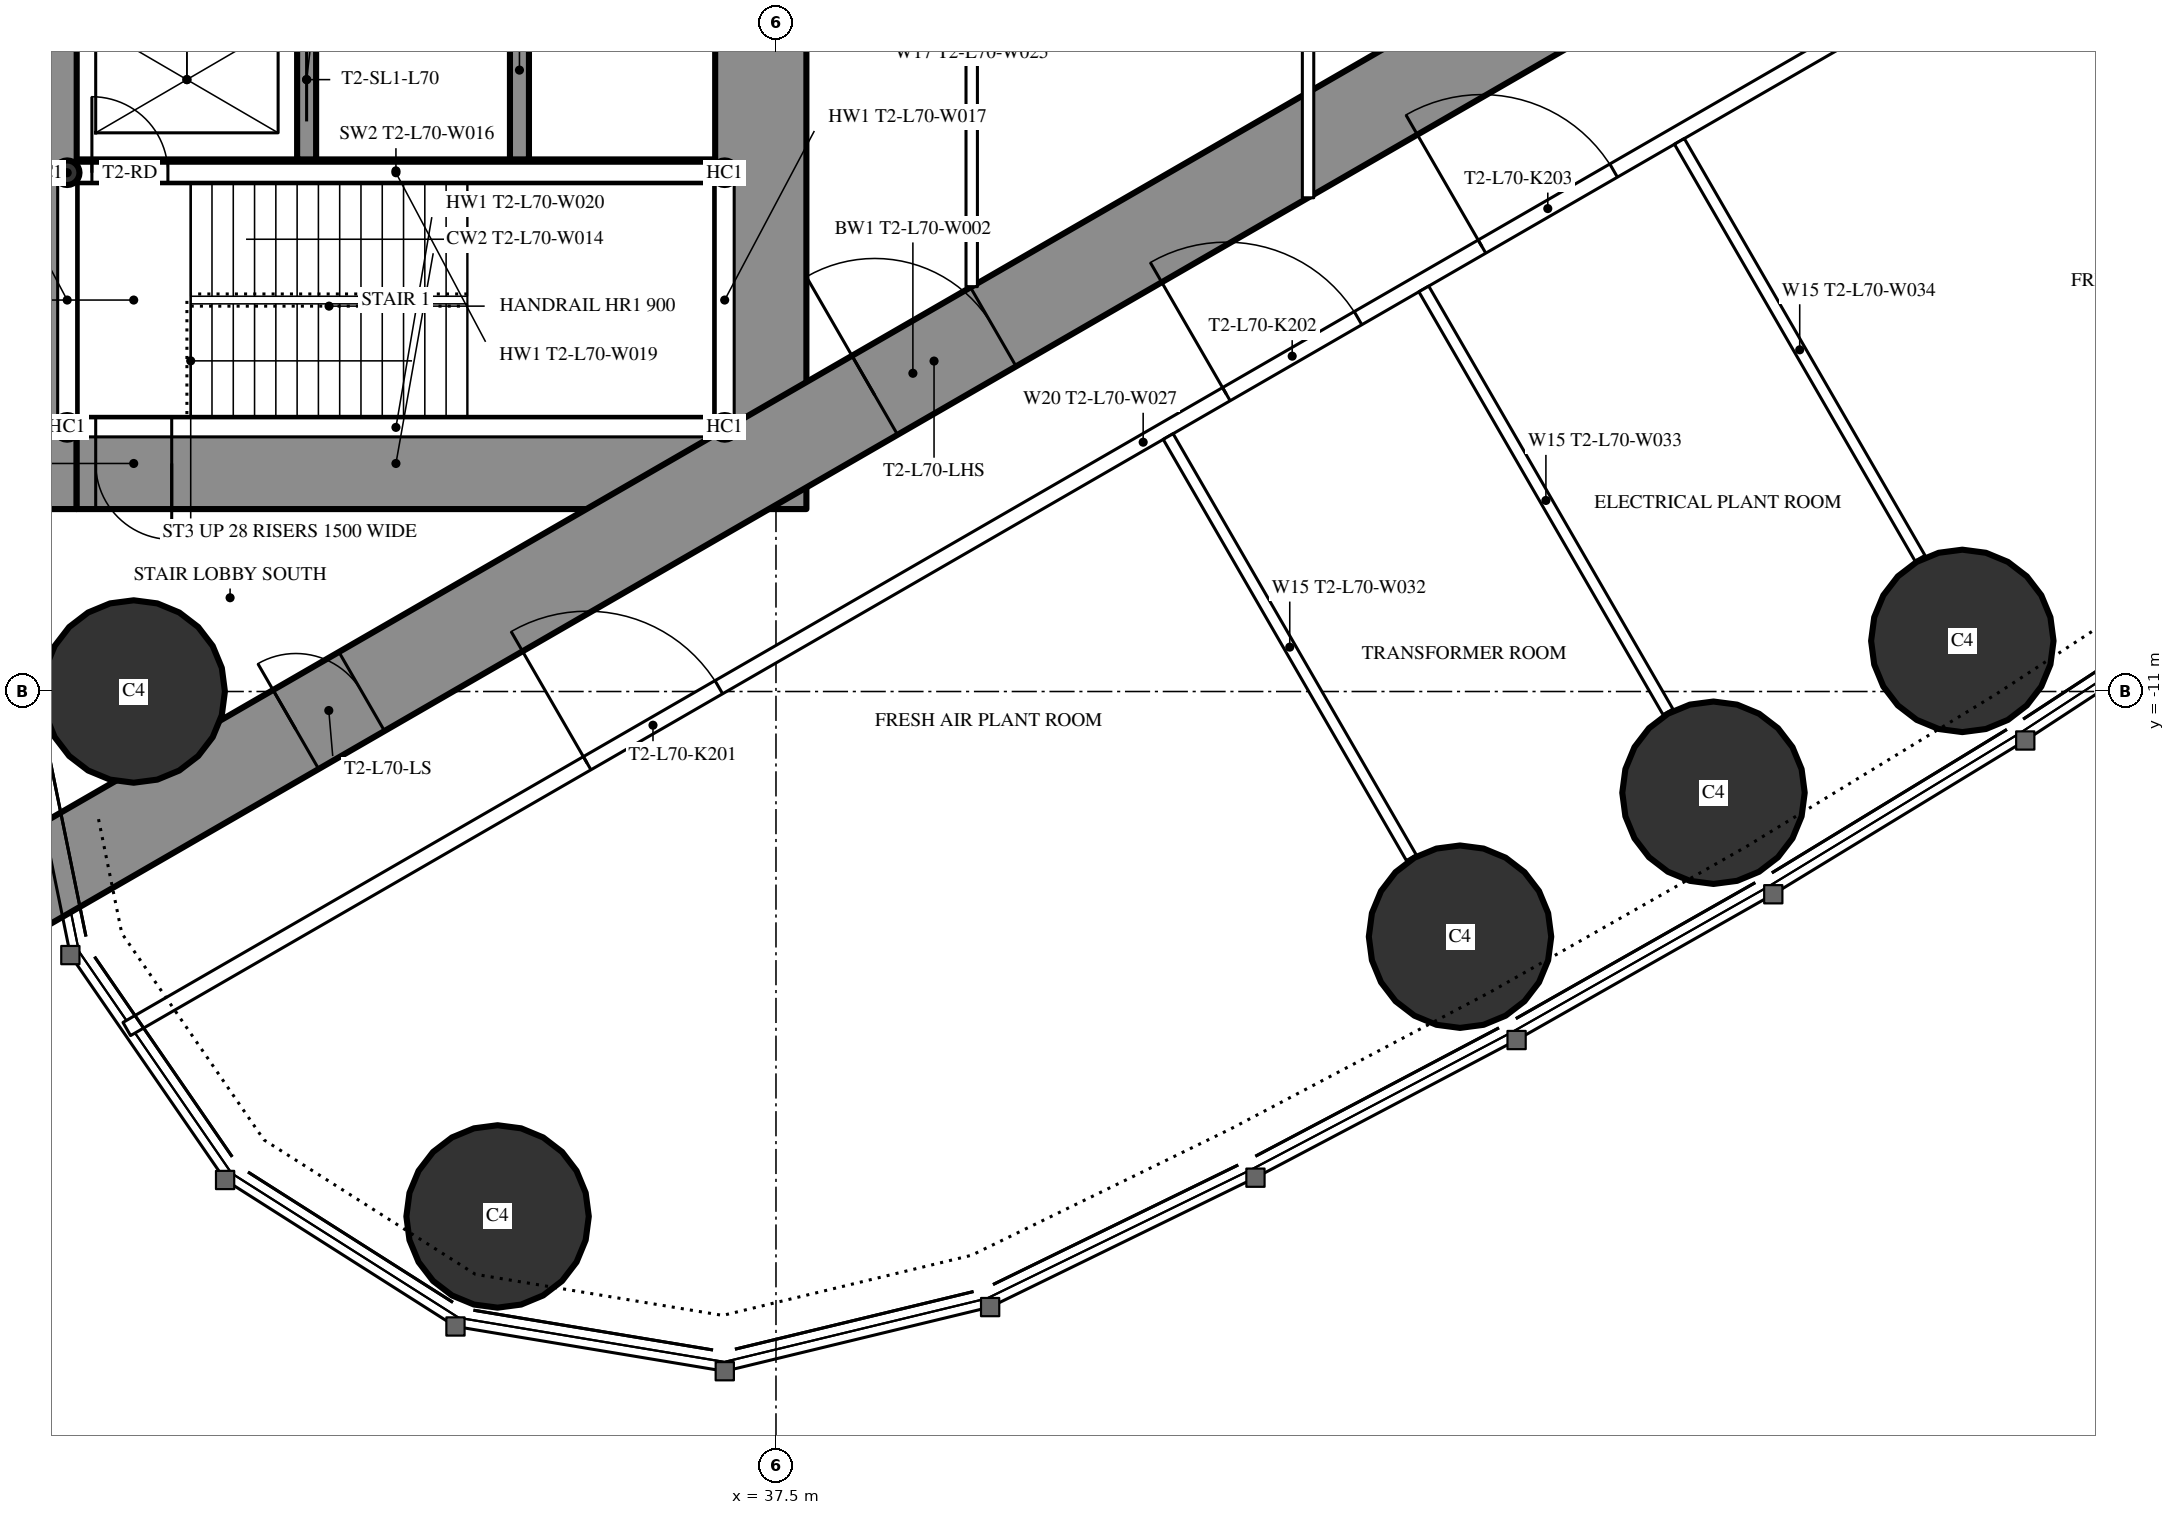
"""IFC4 building model, lengths in metres.
Left out: names, types, materials, properties, quantities, classifications, styles, units other than length and angle.
Written with IfcOpenShell. Run it as: python <this file> out.ifc"""

import sys

from ifc_helpers import new_model, si_unit, direction, frame, frame_2d, origin, origin_2d, place, context, subcontext, project, spatial, rectangle, circle, hollow_circle, extrude, element, fill, save


model = new_model("IFC4")
c1 = context("Model", 3, precision=1e-05, world=origin(), true_north=direction((0.0, 1.0)))
c2 = subcontext(c1, "Body", "Model", "MODEL_VIEW")
j1 = project(units=[si_unit("LENGTHUNIT", "METRE"), si_unit("PLANEANGLEUNIT", "RADIAN")], contexts=[c1])
p1 = place(None, origin())
s1 = spatial("IfcSite", under=j1, at=p1, CompositionType="ELEMENT")
p2 = place(p1, origin())
s2 = spatial("IfcBuilding", under=s1, at=p2, CompositionType="ELEMENT")
p3 = place(p2, frame((0.0, 0.0, 268.3)))
s3 = spatial("IfcBuildingStorey", under=s2, at=p3, CompositionType="ELEMENT", Elevation=268.3)
for number, where, z_axis, x_axis in (
    (1, (33.837, -17.906, 0.0), (0.0, 0.0, 1.0), (1.0, 0.0, 0.0)),
    (2, (29.05, -11.0, 0.0), (0.0, 0.0, 1.0), (1.0, 0.0, 0.0)),
    (3, (46.499, -14.226, 0.0), (0.0, 0.0, 1.0), (1.0, 0.0, 0.0)),
    (4, (49.834, -12.332, 0.0), (0.0, 0.0, 1.0), (1.0, 0.0, 0.0)),
    (5, (53.108, -10.334, 0.0), (0.0, 0.0, 1.0), (1.0, 0.0, 0.0)),
):
    element("IfcColumn", number, at=place(p3, frame(where, z_axis=z_axis, x_axis=x_axis)), inside=s3, PredefinedType="COLUMN", context=c2, shape_type="SweptSolid", body=[
        extrude(circle(Radius=1.2, at=origin_2d()), origin(), (0.0, 0.0, 1.0), 5.0),
    ])
p4 = place(p3, frame((27.9, -8.6, 0.0), z_axis=(0.0, 0.0, 1.0), x_axis=(0.0, 1.0, 0.0)))
e6 = element("IfcWall", 6, at=p4, inside=s3, PredefinedType="SHEAR", context=c2, shape_type="SweptSolid", body=[
    extrude(rectangle(XDim=17.2, YDim=0.8, at=frame_2d((8.6, 0.0))), origin(), (0.0, 0.0, 1.0), 5.0),
])
p5 = place(p4, frame((9.35, 0.0, 0.0)))
e7 = element("IfcOpeningElement", 7, at=p5, cuts=e6, PredefinedType="OPENING", context=c2, shape_type="SweptSolid", body=[
    extrude(rectangle(XDim=0.9, YDim=2.2, at=frame_2d((0.45, 1.1))), frame((0.0, 0.41, 0.0), z_axis=(0.0, -1.0, 0.0), x_axis=(1.0, 0.0, 0.0)), (0.0, 0.0, 1.0), 0.82),
])
p6 = place(p3, frame((37.3, -8.6, 0.0), z_axis=(0.0, 0.0, 1.0), x_axis=(0.0, 1.0, 0.0)))
e8 = element("IfcWall", 8, at=p6, inside=s3, PredefinedType="SHEAR", context=c2, shape_type="SweptSolid", body=[
    extrude(rectangle(XDim=17.2, YDim=1.2, at=frame_2d((8.6, 0.0))), origin(), (0.0, 0.0, 1.0), 5.0),
])
p7 = place(p6, frame((7.7, 0.0, 0.0)))
e9 = element("IfcOpeningElement", 9, at=p7, cuts=e8, PredefinedType="OPENING", context=c2, shape_type="SweptSolid", body=[
    extrude(rectangle(XDim=1.8, YDim=2.2, at=frame_2d((0.9, 1.1))), frame((0.0, 0.61, 0.0), z_axis=(0.0, -1.0, 0.0), x_axis=(1.0, 0.0, 0.0)), (0.0, 0.0, 1.0), 1.22),
])
p8 = place(p3, frame((28.3, -8.0, 0.0), z_axis=(0.0, 0.0, 1.0), x_axis=(1.0, 0.0, 0.0)))
e10 = element("IfcWall", 10, at=p8, inside=s3, PredefinedType="SHEAR", context=c2, shape_type="SweptSolid", body=[
    extrude(rectangle(XDim=8.4, YDim=1.2, at=frame_2d((4.2, 0.0))), origin(), (0.0, 0.0, 1.0), 5.0),
])
p9 = place(p8, frame((0.25, 0.0, 0.0)))
e11 = element("IfcOpeningElement", 11, at=p9, cuts=e10, PredefinedType="OPENING", context=c2, shape_type="SweptSolid", body=[
    extrude(rectangle(XDim=1.0, YDim=2.2, at=frame_2d((0.5, 1.1))), frame((0.0, 0.61, 0.0), z_axis=(0.0, -1.0, 0.0), x_axis=(1.0, 0.0, 0.0)), (0.0, 0.0, 1.0), 1.22),
])
p10 = place(p3, frame((28.3, -4.15, 0.0), z_axis=(0.0, 0.0, 1.0), x_axis=(1.0, 0.0, 0.0)))
e12 = element("IfcWall", 12, at=p10, inside=s3, PredefinedType="SHEAR", context=c2, shape_type="SweptSolid", body=[
    extrude(rectangle(XDim=8.4, YDim=0.3, at=frame_2d((4.2, 0.0))), origin(), (0.0, 0.0, 1.0), 5.0),
])
p11 = place(p3, frame((31.325, -4.0, 0.0), z_axis=(0.0, 0.0, 1.0), x_axis=(0.0, 1.0, 0.0)))
e13 = element("IfcWall", 13, at=p11, inside=s3, PredefinedType="SHEAR", context=c2, shape_type="SweptSolid", body=[
    extrude(rectangle(XDim=2.1, YDim=0.25, at=frame_2d((1.05, 0.0))), origin(), (0.0, 0.0, 1.0), 5.0),
])
p12 = place(p11, frame((0.5, 0.0, 0.0)))
e14 = element("IfcOpeningElement", 14, at=p12, cuts=e13, PredefinedType="OPENING", context=c2, shape_type="SweptSolid", body=[
    extrude(rectangle(XDim=1.1, YDim=2.2, at=frame_2d((0.55, 1.1))), frame((0.0, 0.135, 0.0), z_axis=(0.0, -1.0, 0.0), x_axis=(1.0, 0.0, 0.0)), (0.0, 0.0, 1.0), 0.27),
])
p13 = place(p3, frame((34.125, -4.0, 0.0), z_axis=(0.0, 0.0, 1.0), x_axis=(0.0, 1.0, 0.0)))
e15 = element("IfcWall", 15, at=p13, inside=s3, PredefinedType="SHEAR", context=c2, shape_type="SweptSolid", body=[
    extrude(rectangle(XDim=2.35, YDim=0.25, at=frame_2d((1.175, 0.0))), origin(), (0.0, 0.0, 1.0), 5.0),
])
p14 = place(p3, frame((27.2, -13.8, 0.0), z_axis=(0.0, 0.0, 1.0), x_axis=(0.866027159892, 0.499996958321, 0.0)))
e16 = element("IfcWall", 16, at=p14, inside=s3, PredefinedType="SHEAR", context=c2, shape_type="SweptSolid", body=[
    extrude(rectangle(XDim=27.947, YDim=1.2, at=frame_2d((13.973, 0.0))), origin(), (0.0, 0.0, 1.0), 5.0),
])
p15 = place(p14, frame((4.6, 0.0, 0.0)))
e17 = element("IfcOpeningElement", 17, at=p15, cuts=e16, PredefinedType="OPENING", context=c2, shape_type="SweptSolid", body=[
    extrude(rectangle(XDim=1.0, YDim=2.2, at=frame_2d((0.5, 1.1))), frame((0.0, 0.61, 0.0), z_axis=(0.0, -1.0, 0.0), x_axis=(1.0, 0.0, 0.0)), (0.0, 0.0, 1.0), 1.22),
])
p16 = place(p14, frame((13.395, 0.0, 0.0)))
e18 = element("IfcOpeningElement", 18, at=p16, cuts=e16, PredefinedType="OPENING", context=c2, shape_type="SweptSolid", body=[
    extrude(rectangle(XDim=1.8, YDim=2.2, at=frame_2d((0.9, 1.1))), frame((0.0, 0.61, 0.0), z_axis=(0.0, -1.0, 0.0), x_axis=(1.0, 0.0, 0.0)), (0.0, 0.0, 1.0), 1.22),
])
for number, where, z_axis, x_axis in (
    (19, (28.175, -7.525, 5.0), (0.0, 0.0, 1.0), (1.0, 0.0, 0.0)),
    (20, (36.825, -7.525, 5.0), (0.0, 0.0, 1.0), (1.0, 0.0, 0.0)),
    (21, (28.175, -4.175, 5.0), (0.0, 0.0, 1.0), (1.0, 0.0, 0.0)),
    (22, (36.825, -4.175, 5.0), (0.0, 0.0, 1.0), (1.0, 0.0, 0.0)),
):
    element("IfcColumn", number, at=place(p3, frame(where, z_axis=z_axis, x_axis=x_axis)), inside=s3, PredefinedType="COLUMN", context=c2, shape_type="SweptSolid", body=[
        extrude(hollow_circle(Radius=0.162, WallThickness=0.012, at=origin_2d()), origin(), (0.0, 0.0, 1.0), 3.0),
    ])
for number, where, z_axis, x_axis in (
    (23, (28.175, -7.422, 5.0), (0.0, 0.0, 1.0), (0.0, 1.0, 0.0)),
    (24, (36.825, -7.422, 5.0), (0.0, 0.0, 1.0), (0.0, 1.0, 0.0)),
):
    element("IfcWall", number, at=place(p3, frame(where, z_axis=z_axis, x_axis=x_axis)), inside=s3, PredefinedType="SOLIDWALL", context=c2, shape_type="SweptSolid", body=[
        extrude(rectangle(XDim=3.144, YDim=0.25, at=frame_2d((1.572, 0.0))), origin(), (0.0, 0.0, 1.0), 2.54),
    ])
p17 = place(p3, frame((28.278, -7.525, 5.0), z_axis=(0.0, 0.0, 1.0), x_axis=(1.0, 0.0, 0.0)))
e25 = element("IfcWall", 25, at=p17, inside=s3, PredefinedType="SOLIDWALL", context=c2, shape_type="SweptSolid", body=[
    extrude(rectangle(XDim=8.444, YDim=0.25, at=frame_2d((4.222, 0.0))), origin(), (0.0, 0.0, 1.0), 2.54),
])
p18 = place(p3, frame((28.278, -4.175, 5.0), z_axis=(0.0, 0.0, 1.0), x_axis=(1.0, 0.0, 0.0)))
e26 = element("IfcWall", 26, at=p18, inside=s3, PredefinedType="SOLIDWALL", context=c2, shape_type="SweptSolid", body=[
    extrude(rectangle(XDim=8.444, YDim=0.25, at=frame_2d((4.222, 0.0))), origin(), (0.0, 0.0, 1.0), 2.54),
])
p19 = place(p18, frame((0.222, 0.0, 0.0)))
e27 = element("IfcOpeningElement", 27, at=p19, cuts=e26, PredefinedType="OPENING", context=c2, shape_type="SweptSolid", body=[
    extrude(rectangle(XDim=1.0, YDim=2.2, at=frame_2d((0.5, 1.1))), frame((0.0, 0.135, 0.0), z_axis=(0.0, -1.0, 0.0), x_axis=(1.0, 0.0, 0.0)), (0.0, 0.0, 1.0), 0.27),
])
p20 = place(p3, frame((28.959, -15.44, 0.0), z_axis=(0.0, 0.0, 1.0), x_axis=(0.866025227435, 0.500000305447, 0.0)))
e28 = element("IfcWall", 28, at=p20, inside=s3, PredefinedType="PARTITIONING", context=c2, shape_type="SweptSolid", body=[
    extrude(rectangle(XDim=30.88, YDim=0.2, at=frame_2d((15.44, 0.0))), origin(), (0.0, 0.0, 1.0), 4.7),
])
p21 = place(p20, frame((6.994, 0.0, 0.0)))
e29 = element("IfcOpeningElement", 29, at=p21, cuts=e28, PredefinedType="OPENING", context=c2, shape_type="SweptSolid", body=[
    extrude(rectangle(XDim=2.0, YDim=2.4, at=frame_2d((1.0, 1.2))), frame((0.0, 0.11, 0.0), z_axis=(0.0, -1.0, 0.0), x_axis=(1.0, 0.0, 0.0)), (0.0, 0.0, 1.0), 0.22),
])
p22 = place(p20, frame((16.704, 0.0, 0.0)))
e30 = element("IfcOpeningElement", 30, at=p22, cuts=e28, PredefinedType="OPENING", context=c2, shape_type="SweptSolid", body=[
    extrude(rectangle(XDim=2.0, YDim=2.4, at=frame_2d((1.0, 1.2))), frame((0.0, 0.11, 0.0), z_axis=(0.0, -1.0, 0.0), x_axis=(1.0, 0.0, 0.0)), (0.0, 0.0, 1.0), 0.22),
])
p23 = place(p20, frame((20.587, 0.0, 0.0)))
e31 = element("IfcOpeningElement", 31, at=p23, cuts=e28, PredefinedType="OPENING", context=c2, shape_type="SweptSolid", body=[
    extrude(rectangle(XDim=2.0, YDim=2.4, at=frame_2d((1.0, 1.2))), frame((0.0, 0.11, 0.0), z_axis=(0.0, -1.0, 0.0), x_axis=(1.0, 0.0, 0.0)), (0.0, 0.0, 1.0), 0.22),
])
p24 = place(p20, frame((26.092, 0.0, 0.0)))
e32 = element("IfcOpeningElement", 32, at=p24, cuts=e28, PredefinedType="OPENING", context=c2, shape_type="SweptSolid", body=[
    extrude(rectangle(XDim=2.0, YDim=2.4, at=frame_2d((1.0, 1.2))), frame((0.0, 0.11, 0.0), z_axis=(0.0, -1.0, 0.0), x_axis=(1.0, 0.0, 0.0)), (0.0, 0.0, 1.0), 0.22),
])
p25 = place(p3, frame((42.66, -7.646, 0.0), z_axis=(0.0, 0.0, 1.0), x_axis=(0.499996592859, -0.866027370889, 0.0)))
e33 = element("IfcWall", 33, at=p25, inside=s3, PredefinedType="PARTITIONING", context=c2, shape_type="SweptSolid", body=[
    extrude(rectangle(XDim=6.398, YDim=0.15, at=frame_2d((3.199, 0.0))), origin(), (0.0, 0.0, 1.0), 3.8),
])
p26 = place(p3, frame((46.023, -5.704, 0.0), z_axis=(0.0, 0.0, 1.0), x_axis=(0.499984478165, -0.866034365135, 0.0)))
e34 = element("IfcWall", 34, at=p26, inside=s3, PredefinedType="PARTITIONING", context=c2, shape_type="SweptSolid", body=[
    extrude(rectangle(XDim=6.426, YDim=0.15, at=frame_2d((3.213, 0.0))), origin(), (0.0, 0.0, 1.0), 3.8),
])
p27 = place(p3, frame((49.385, -3.763, 0.0), z_axis=(0.0, 0.0, 1.0), x_axis=(0.499999447814, -0.866025722589, 0.0)))
e35 = element("IfcWall", 35, at=p27, inside=s3, PredefinedType="PARTITIONING", context=c2, shape_type="SweptSolid", body=[
    extrude(rectangle(XDim=6.333, YDim=0.15, at=frame_2d((3.166, 0.0))), origin(), (0.0, 0.0, 1.0), 3.8),
])
p28 = place(p3, frame((40.075, -5.674, 0.0), z_axis=(0.0, 0.0, 1.0), x_axis=(0.0, 1.0, 0.0)))
e36 = element("IfcWall", 36, at=p28, inside=s3, PredefinedType="PARTITIONING", context=c2, shape_type="SweptSolid", body=[
    extrude(rectangle(XDim=11.348, YDim=0.15, at=frame_2d((5.674, 0.0))), origin(), (0.0, 0.0, 1.0), 4.7),
])
p29 = place(p28, frame((4.774, 0.0, 0.0)))
e37 = element("IfcOpeningElement", 37, at=p29, cuts=e36, PredefinedType="OPENING", context=c2, shape_type="SweptSolid", body=[
    extrude(rectangle(XDim=1.8, YDim=2.2, at=frame_2d((0.9, 1.1))), frame((0.0, 0.085, 0.0), z_axis=(0.0, -1.0, 0.0), x_axis=(1.0, 0.0, 0.0)), (0.0, 0.0, 1.0), 0.17),
])
p30 = place(p3, frame((44.5, -4.505, 0.0), z_axis=(0.0, 0.0, 1.0), x_axis=(0.0, 1.0, 0.0)))
e38 = element("IfcWall", 38, at=p30, inside=s3, PredefinedType="PARTITIONING", context=c2, shape_type="SweptSolid", body=[
    extrude(rectangle(XDim=9.009, YDim=0.15, at=frame_2d((4.505, 0.0))), origin(), (0.0, 0.0, 1.0), 4.7),
])
p31 = place(p30, frame((4.005, 0.0, 0.0)))
e39 = element("IfcOpeningElement", 39, at=p31, cuts=e38, PredefinedType="OPENING", context=c2, shape_type="SweptSolid", body=[
    extrude(rectangle(XDim=1.0, YDim=2.2, at=frame_2d((0.5, 1.1))), frame((0.0, 0.085, 0.0), z_axis=(0.0, -1.0, 0.0), x_axis=(1.0, 0.0, 0.0)), (0.0, 0.0, 1.0), 0.17),
])
p32 = place(p19, origin())
e40 = element("IfcDoor", 40, at=p32, inside=s3, OperationType="SINGLE_SWING_LEFT", PredefinedType="DOOR", context=c2, shape_type="SweptSolid", body=[
    extrude(rectangle(XDim=1.0, YDim=2.2, at=frame_2d((0.5, 1.1))), frame((0.0, 0.025, 0.0), z_axis=(0.0, -1.0, 0.0), x_axis=(1.0, 0.0, 0.0)), (0.0, 0.0, 1.0), 0.05),
])
fill(e27, e40)
p33 = place(p21, origin())
e41 = element("IfcDoor", 41, at=p33, inside=s3, OperationType="DOUBLE_DOOR_SINGLE_SWING", PredefinedType="DOOR", context=c2, shape_type="SweptSolid", body=[
    extrude(rectangle(XDim=2.0, YDim=2.4, at=frame_2d((1.0, 1.2))), frame((0.0, 0.025, 0.0), z_axis=(0.0, -1.0, 0.0), x_axis=(1.0, 0.0, 0.0)), (0.0, 0.0, 1.0), 0.05),
])
fill(e29, e41)
p34 = place(p22, origin())
e42 = element("IfcDoor", 42, at=p34, inside=s3, OperationType="DOUBLE_DOOR_SINGLE_SWING", PredefinedType="DOOR", context=c2, shape_type="SweptSolid", body=[
    extrude(rectangle(XDim=2.0, YDim=2.4, at=frame_2d((1.0, 1.2))), frame((0.0, 0.025, 0.0), z_axis=(0.0, -1.0, 0.0), x_axis=(1.0, 0.0, 0.0)), (0.0, 0.0, 1.0), 0.05),
])
fill(e30, e42)
p35 = place(p23, origin())
e43 = element("IfcDoor", 43, at=p35, inside=s3, OperationType="DOUBLE_DOOR_SINGLE_SWING", PredefinedType="DOOR", context=c2, shape_type="SweptSolid", body=[
    extrude(rectangle(XDim=2.0, YDim=2.4, at=frame_2d((1.0, 1.2))), frame((0.0, 0.025, 0.0), z_axis=(0.0, -1.0, 0.0), x_axis=(1.0, 0.0, 0.0)), (0.0, 0.0, 1.0), 0.05),
])
fill(e31, e43)
p36 = place(p15, origin())
e44 = element("IfcDoor", 44, at=p36, inside=s3, OperationType="SINGLE_SWING_LEFT", PredefinedType="DOOR", context=c2, shape_type="SweptSolid", body=[
    extrude(rectangle(XDim=1.0, YDim=2.2, at=frame_2d((0.5, 1.1))), frame((0.0, 0.025, 0.0), z_axis=(0.0, -1.0, 0.0), x_axis=(1.0, 0.0, 0.0)), (0.0, 0.0, 1.0), 0.05),
])
fill(e17, e44)
p37 = place(p16, origin())
e45 = element("IfcDoor", 45, at=p37, inside=s3, OperationType="DOUBLE_DOOR_SINGLE_SWING", PredefinedType="DOOR", context=c2, shape_type="SweptSolid", body=[
    extrude(rectangle(XDim=1.8, YDim=2.2, at=frame_2d((0.9, 1.1))), frame((0.0, 0.025, 0.0), z_axis=(0.0, -1.0, 0.0), x_axis=(1.0, 0.0, 0.0)), (0.0, 0.0, 1.0), 0.05),
])
fill(e18, e45)
p38 = place(p9, origin())
e46 = element("IfcDoor", 46, at=p38, inside=s3, OperationType="SINGLE_SWING_RIGHT", PredefinedType="DOOR", context=c2, shape_type="SweptSolid", body=[
    extrude(rectangle(XDim=1.0, YDim=2.2, at=frame_2d((0.5, 1.1))), frame((0.0, 0.025, 0.0), z_axis=(0.0, -1.0, 0.0), x_axis=(1.0, 0.0, 0.0)), (0.0, 0.0, 1.0), 0.05),
])
fill(e11, e46)
p39 = place(p12, origin())
e47 = element("IfcDoor", 47, at=p39, inside=s3, OperationType="SLIDING_TO_LEFT", PredefinedType="USERDEFINED", context=c2, shape_type="SweptSolid", body=[
    extrude(rectangle(XDim=1.1, YDim=2.2, at=frame_2d((0.55, 1.1))), frame((0.0, 0.025, 0.0), z_axis=(0.0, -1.0, 0.0), x_axis=(1.0, 0.0, 0.0)), (0.0, 0.0, 1.0), 0.05),
])
fill(e14, e47)
save(model, sys.argv[1])
